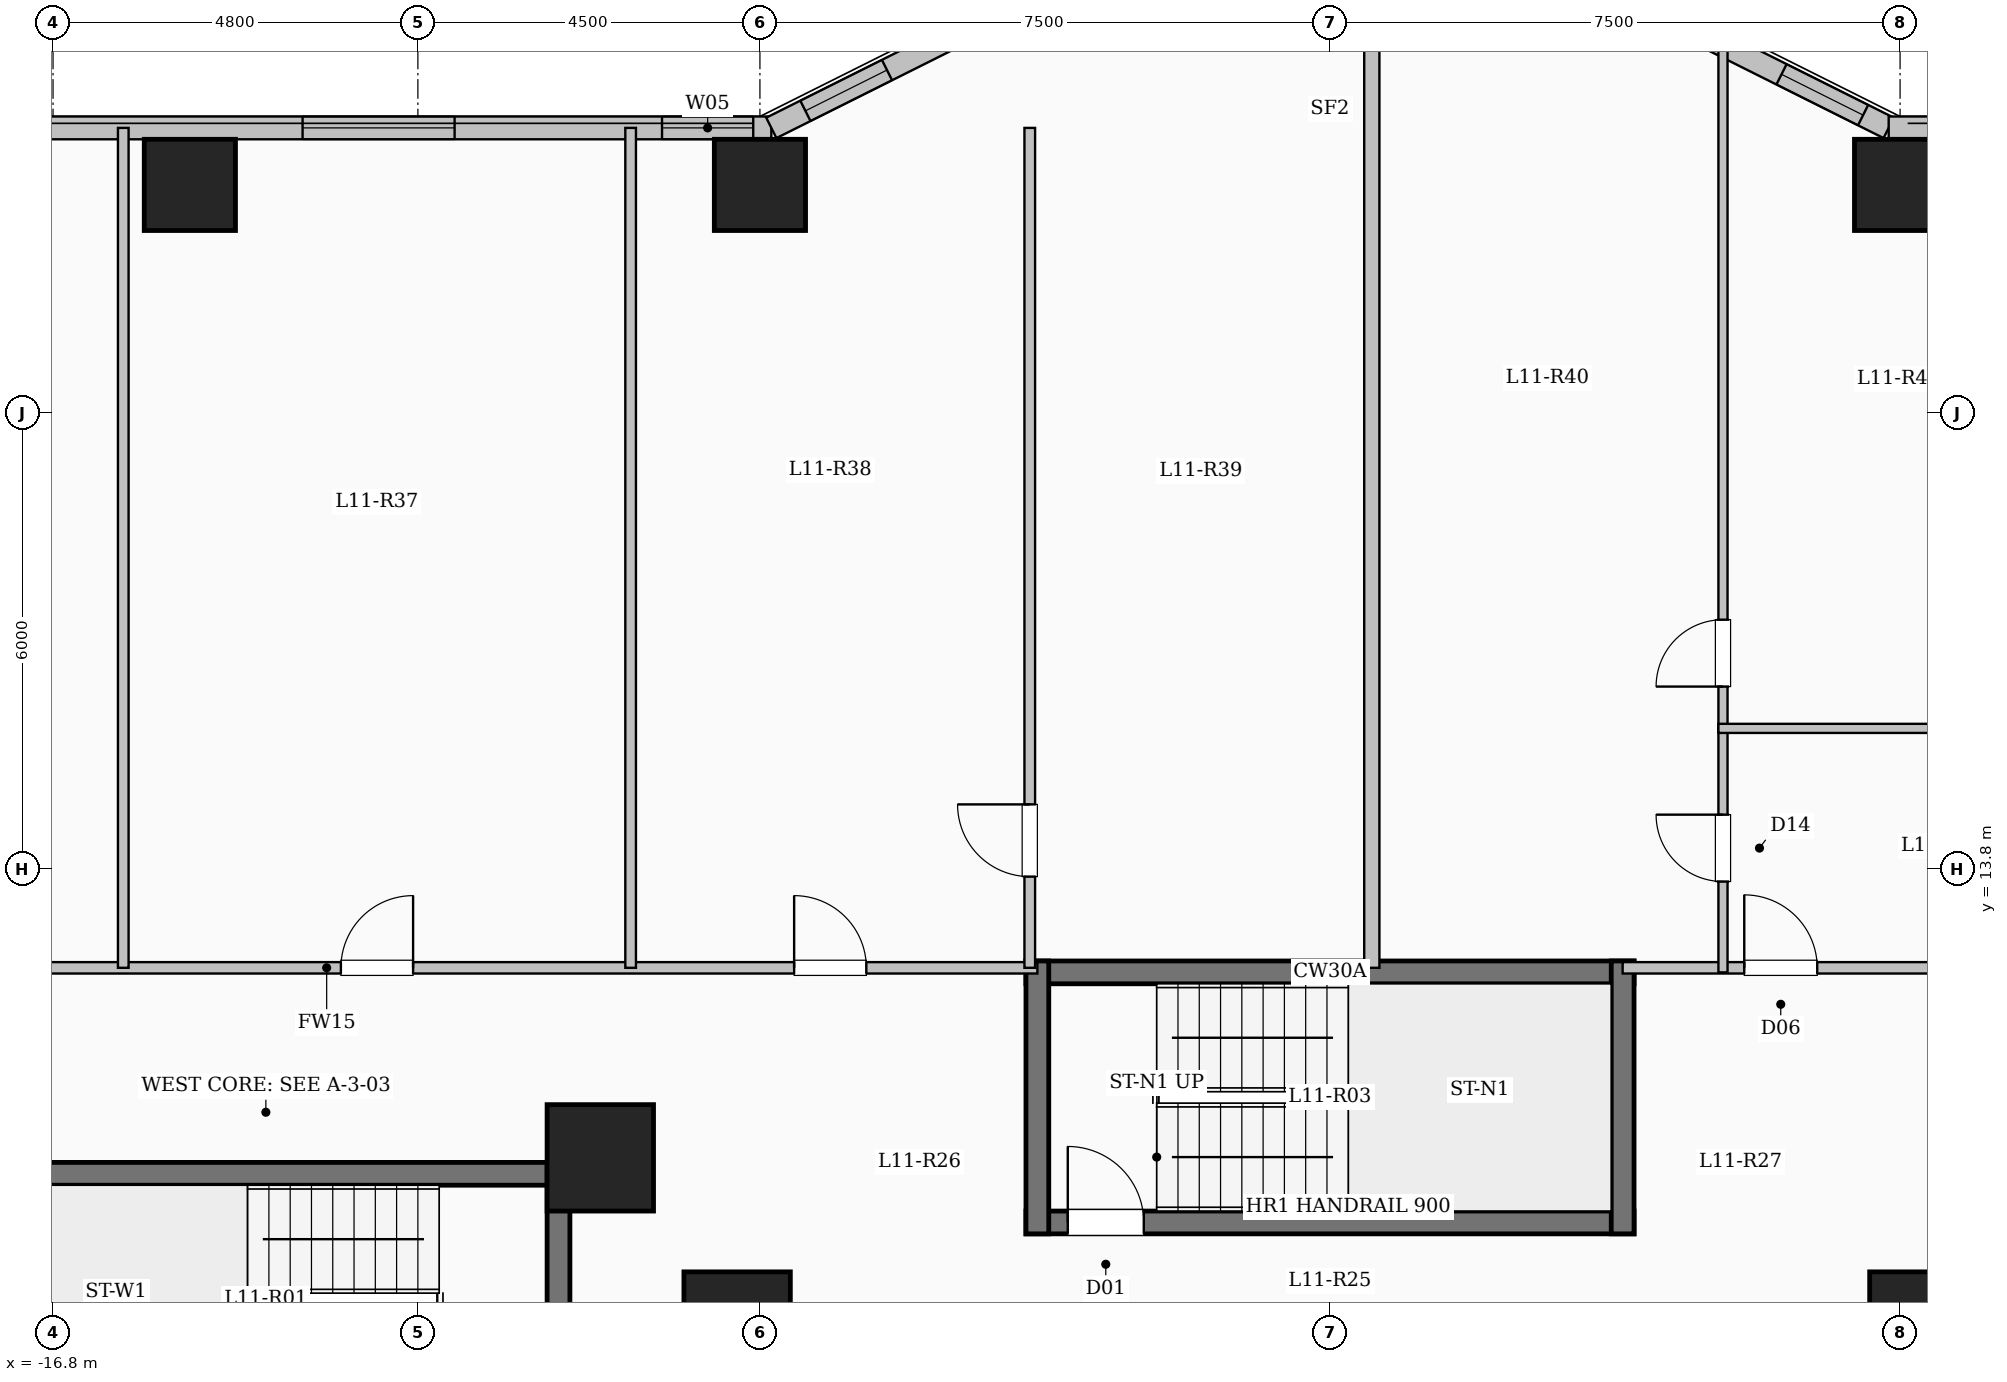
"""IFC4 building model, lengths in metres.
Left out: names, types, materials, properties, quantities, classifications, styles, units other than length and angle.
Written with IfcOpenShell. Run it as: python <this file> out.ifc"""

import sys

from ifc_helpers import new_model, si_unit, direction, frame, frame_2d, origin, origin_2d, place, context, subcontext, project, spatial, rectangle, extrude, element, fill, save


model = new_model("IFC4")
c1 = context("Model", 3, precision=1e-05, world=origin(), true_north=direction((0.0, 1.0)))
c2 = subcontext(c1, "Body", "Model", "MODEL_VIEW")
j1 = project(units=[si_unit("LENGTHUNIT", "METRE"), si_unit("PLANEANGLEUNIT", "RADIAN")], contexts=[c1])
p1 = place(None, origin())
s1 = spatial("IfcSite", under=j1, at=p1, CompositionType="ELEMENT")
p2 = place(p1, origin())
s2 = spatial("IfcBuilding", under=s1, at=p2, CompositionType="ELEMENT")
p3 = place(p2, frame((0.0, 0.0, 44.1)))
s3 = spatial("IfcBuildingStorey", under=s2, at=p3, CompositionType="ELEMENT", Elevation=44.1)
for number, where, z_axis, x_axis in (
    (1, (-7.8, 7.8, 0.0), (0.0, 0.0, 1.0), (1.0, 0.0, 0.0)),
    (2, (7.8, 7.8, 0.0), (0.0, 0.0, 1.0), (1.0, 0.0, 0.0)),
    (3, (-9.6, 10.0, 0.0), (0.0, 0.0, 1.0), (1.0, 0.0, 0.0)),
):
    element("IfcColumn", number, at=place(p3, frame(where, z_axis=z_axis, x_axis=x_axis)), inside=s3, PredefinedType="COLUMN", context=c2, shape_type="SweptSolid", body=[
        extrude(rectangle(XDim=1.4, YDim=1.4, at=origin_2d()), origin(), (0.0, 0.0, 1.0), 3.35),
    ])
for number, where, z_axis, x_axis in (
    (4, (-15.0, 22.8, 0.0), (0.0, 0.0, 1.0), (1.0, 0.0, 0.0)),
    (5, (-7.5, 22.8, 0.0), (0.0, 0.0, 1.0), (1.0, 0.0, 0.0)),
    (6, (7.5, 22.8, 0.0), (0.0, 0.0, 1.0), (1.0, 0.0, 0.0)),
):
    element("IfcColumn", number, at=place(p3, frame(where, z_axis=z_axis, x_axis=x_axis)), inside=s3, PredefinedType="COLUMN", context=c2, shape_type="SweptSolid", body=[
        extrude(rectangle(XDim=1.2, YDim=1.2, at=origin_2d()), origin(), (0.0, 0.0, 1.0), 3.35),
    ])
p4 = place(p3, frame((-22.65, 23.55, 0.0), z_axis=(0.0, 0.0, 1.0), x_axis=(1.0, 0.0, 0.0)))
e7 = element("IfcWall", 7, at=p4, inside=s3, PredefinedType="SOLIDWALL", context=c2, shape_type="SweptSolid", body=[
    extrude(rectangle(XDim=15.3, YDim=0.3, at=frame_2d((7.65, 0.0))), origin(), (0.0, 0.0, 1.0), 3.1),
])
p5 = place(p4, frame((2.411, 0.0, 0.9)))
e8 = element("IfcOpeningElement", 8, at=p5, cuts=e7, PredefinedType="OPENING", context=c2, shape_type="SweptSolid", body=[
    extrude(rectangle(XDim=2.0, YDim=1.7, at=frame_2d((1.0, 0.85))), frame((0.0, 0.16, 0.0), z_axis=(0.0, -1.0, 0.0), x_axis=(1.0, 0.0, 0.0)), (0.0, 0.0, 1.0), 0.32),
])
p6 = place(p4, frame((9.133, 0.0, 0.9)))
e9 = element("IfcOpeningElement", 9, at=p6, cuts=e7, PredefinedType="OPENING", context=c2, shape_type="SweptSolid", body=[
    extrude(rectangle(XDim=2.0, YDim=1.7, at=frame_2d((1.0, 0.85))), frame((0.0, 0.16, 0.0), z_axis=(0.0, -1.0, 0.0), x_axis=(1.0, 0.0, 0.0)), (0.0, 0.0, 1.0), 0.32),
])
p7 = place(p4, frame((13.862, 0.0, 0.95)))
e10 = element("IfcOpeningElement", 10, at=p7, cuts=e7, PredefinedType="OPENING", context=c2, shape_type="SweptSolid", body=[
    extrude(rectangle(XDim=1.2, YDim=1.5, at=frame_2d((0.6, 0.75))), frame((0.0, 0.16, 0.0), z_axis=(0.0, -1.0, 0.0), x_axis=(1.0, 0.0, 0.0)), (0.0, 0.0, 1.0), 0.32),
])
p8 = place(p3, frame((-7.35, 23.55, 0.0), z_axis=(0.0, 0.0, 1.0), x_axis=(0.894427191, 0.4472135955, 0.0)))
e11 = element("IfcWall", 11, at=p8, inside=s3, PredefinedType="SOLIDWALL", context=c2, shape_type="SweptSolid", body=[
    extrude(rectangle(XDim=3.354, YDim=0.3, at=frame_2d((1.677, 0.0))), origin(), (0.0, 0.0, 1.0), 3.1),
])
p9 = place(p8, frame((0.501, 0.0, 0.95)))
e12 = element("IfcOpeningElement", 12, at=p9, cuts=e11, PredefinedType="OPENING", context=c2, shape_type="SweptSolid", body=[
    extrude(rectangle(XDim=1.2, YDim=1.5, at=frame_2d((0.6, 0.75))), frame((0.0, 0.16, 0.0), z_axis=(0.0, -1.0, 0.0), x_axis=(1.0, 0.0, 0.0)), (0.0, 0.0, 1.0), 0.32),
])
p10 = place(p3, frame((4.35, 25.05, 0.0), z_axis=(0.0, 0.0, 1.0), x_axis=(0.894427191, -0.4472135955, 0.0)))
e13 = element("IfcWall", 13, at=p10, inside=s3, PredefinedType="SOLIDWALL", context=c2, shape_type="SweptSolid", body=[
    extrude(rectangle(XDim=3.354, YDim=0.3, at=frame_2d((1.677, 0.0))), origin(), (0.0, 0.0, 1.0), 3.1),
])
p11 = place(p10, frame((1.778, 0.0, 0.95)))
e14 = element("IfcOpeningElement", 14, at=p11, cuts=e13, PredefinedType="OPENING", context=c2, shape_type="SweptSolid", body=[
    extrude(rectangle(XDim=1.2, YDim=1.5, at=frame_2d((0.6, 0.75))), frame((0.0, 0.16, 0.0), z_axis=(0.0, -1.0, 0.0), x_axis=(1.0, 0.0, 0.0)), (0.0, 0.0, 1.0), 0.32),
])
p12 = place(p3, frame((7.35, 23.55, 0.0), z_axis=(0.0, 0.0, 1.0), x_axis=(1.0, 0.0, 0.0)))
e15 = element("IfcWall", 15, at=p12, inside=s3, PredefinedType="SOLIDWALL", context=c2, shape_type="SweptSolid", body=[
    extrude(rectangle(XDim=15.3, YDim=0.3, at=frame_2d((7.65, 0.0))), origin(), (0.0, 0.0, 1.0), 3.1),
])
p13 = place(p12, frame((0.554, 0.0, 0.95)))
e16 = element("IfcOpeningElement", 16, at=p13, cuts=e15, PredefinedType="OPENING", context=c2, shape_type="SweptSolid", body=[
    extrude(rectangle(XDim=1.2, YDim=1.5, at=frame_2d((0.6, 0.75))), frame((0.0, 0.16, 0.0), z_axis=(0.0, -1.0, 0.0), x_axis=(1.0, 0.0, 0.0)), (0.0, 0.0, 1.0), 0.32),
])
p14 = place(p12, frame((4.418, 0.0, 0.9)))
e17 = element("IfcOpeningElement", 17, at=p14, cuts=e15, PredefinedType="OPENING", context=c2, shape_type="SweptSolid", body=[
    extrude(rectangle(XDim=2.4, YDim=1.8, at=frame_2d((1.2, 0.9))), frame((0.0, 0.16, 0.0), z_axis=(0.0, -1.0, 0.0), x_axis=(1.0, 0.0, 0.0)), (0.0, 0.0, 1.0), 0.32),
])
p15 = place(p12, frame((9.634, 0.0, 0.9)))
e18 = element("IfcOpeningElement", 18, at=p15, cuts=e15, PredefinedType="OPENING", context=c2, shape_type="SweptSolid", body=[
    extrude(rectangle(XDim=1.5, YDim=1.65, at=frame_2d((0.75, 0.825))), frame((0.0, 0.16, 0.0), z_axis=(0.0, -1.0, 0.0), x_axis=(1.0, 0.0, 0.0)), (0.0, 0.0, 1.0), 0.32),
])
p16 = place(p12, frame((12.844, 0.0, 0.9)))
e19 = element("IfcOpeningElement", 19, at=p16, cuts=e15, PredefinedType="OPENING", context=c2, shape_type="SweptSolid", body=[
    extrude(rectangle(XDim=1.5, YDim=1.65, at=frame_2d((0.75, 0.825))), frame((0.0, 0.16, 0.0), z_axis=(0.0, -1.0, 0.0), x_axis=(1.0, 0.0, 0.0)), (0.0, 0.0, 1.0), 0.32),
])
p17 = place(p3, frame((-18.0, 9.79, 0.0), z_axis=(0.0, 0.0, 1.0), x_axis=(1.0, 0.0, 0.0)))
e20 = element("IfcWall", 20, at=p17, inside=s3, PredefinedType="SHEAR", context=c2, shape_type="SweptSolid", body=[
    extrude(rectangle(XDim=8.0, YDim=0.3, at=frame_2d((4.0, 0.0))), origin(), (0.0, 0.0, 1.0), 3.35),
])
p18 = place(p3, frame((-10.15, 6.35, 0.0), z_axis=(0.0, 0.0, 1.0), x_axis=(0.0, 1.0, 0.0)))
e21 = element("IfcWall", 21, at=p18, inside=s3, PredefinedType="SHEAR", context=c2, shape_type="SweptSolid", body=[
    extrude(rectangle(XDim=3.59, YDim=0.3, at=frame_2d((1.795, 0.0))), origin(), (0.0, 0.0, 1.0), 3.35),
])
p19 = place(p3, frame((-4.0, 12.44, 0.0), z_axis=(0.0, 0.0, 1.0), x_axis=(1.0, 0.0, 0.0)))
e22 = element("IfcWall", 22, at=p19, inside=s3, PredefinedType="SHEAR", context=c2, shape_type="SweptSolid", body=[
    extrude(rectangle(XDim=8.0, YDim=0.3, at=frame_2d((4.0, 0.0))), origin(), (0.0, 0.0, 1.0), 3.35),
])
p20 = place(p3, frame((-4.0, 9.15, 0.0), z_axis=(0.0, 0.0, 1.0), x_axis=(1.0, 0.0, 0.0)))
e23 = element("IfcWall", 23, at=p20, inside=s3, PredefinedType="SHEAR", context=c2, shape_type="SweptSolid", body=[
    extrude(rectangle(XDim=8.0, YDim=0.3, at=frame_2d((4.0, 0.0))), origin(), (0.0, 0.0, 1.0), 3.35),
])
p21 = place(p20, frame((0.55, 0.0, 0.0)))
e24 = element("IfcOpeningElement", 24, at=p21, cuts=e23, PredefinedType="OPENING", context=c2, shape_type="SweptSolid", body=[
    extrude(rectangle(XDim=1.0, YDim=2.15, at=frame_2d((0.5, 1.075))), frame((0.0, 0.16, 0.0), z_axis=(0.0, -1.0, 0.0), x_axis=(1.0, 0.0, 0.0)), (0.0, 0.0, 1.0), 0.32),
])
for number, where, z_axis, x_axis in (
    (25, (-3.85, 9.0, 0.0), (0.0, 0.0, 1.0), (0.0, 1.0, 0.0)),
    (26, (3.85, 9.0, 0.0), (0.0, 0.0, 1.0), (0.0, 1.0, 0.0)),
):
    element("IfcWall", number, at=place(p3, frame(where, z_axis=z_axis, x_axis=x_axis)), inside=s3, PredefinedType="SHEAR", context=c2, shape_type="SweptSolid", body=[
        extrude(rectangle(XDim=3.59, YDim=0.3, at=frame_2d((1.795, 0.0))), origin(), (0.0, 0.0, 1.0), 3.35),
    ])
p22 = place(p3, frame((-22.55, 12.5, 0.0), z_axis=(0.0, 0.0, 1.0), x_axis=(1.0, 0.0, 0.0)))
e27 = element("IfcWall", 27, at=p22, inside=s3, PredefinedType="PARTITIONING", context=c2, shape_type="SweptSolid", body=[
    extrude(rectangle(XDim=18.7, YDim=0.15, at=frame_2d((9.35, 0.0))), origin(), (0.0, 0.0, 1.0), 3.1),
])
p23 = place(p22, frame((2.832, 0.0, 0.0)))
e28 = element("IfcOpeningElement", 28, at=p23, cuts=e27, PredefinedType="OPENING", context=c2, shape_type="SweptSolid", body=[
    extrude(rectangle(XDim=0.95, YDim=2.15, at=frame_2d((0.475, 1.075))), frame((0.0, 0.085, 0.0), z_axis=(0.0, -1.0, 0.0), x_axis=(1.0, 0.0, 0.0)), (0.0, 0.0, 1.0), 0.17),
])
p24 = place(p22, frame((9.537, 0.0, 0.0)))
e29 = element("IfcOpeningElement", 29, at=p24, cuts=e27, PredefinedType="OPENING", context=c2, shape_type="SweptSolid", body=[
    extrude(rectangle(XDim=0.95, YDim=2.15, at=frame_2d((0.475, 1.075))), frame((0.0, 0.085, 0.0), z_axis=(0.0, -1.0, 0.0), x_axis=(1.0, 0.0, 0.0)), (0.0, 0.0, 1.0), 0.17),
])
p25 = place(p22, frame((15.5, 0.0, 0.0)))
e30 = element("IfcOpeningElement", 30, at=p25, cuts=e27, PredefinedType="OPENING", context=c2, shape_type="SweptSolid", body=[
    extrude(rectangle(XDim=0.95, YDim=2.15, at=frame_2d((0.475, 1.075))), frame((0.0, 0.085, 0.0), z_axis=(0.0, -1.0, 0.0), x_axis=(1.0, 0.0, 0.0)), (0.0, 0.0, 1.0), 0.17),
])
p26 = place(p3, frame((3.85, 12.5, 0.0), z_axis=(0.0, 0.0, 1.0), x_axis=(1.0, 0.0, 0.0)))
e31 = element("IfcWall", 31, at=p26, inside=s3, PredefinedType="PARTITIONING", context=c2, shape_type="SweptSolid", body=[
    extrude(rectangle(XDim=18.7, YDim=0.15, at=frame_2d((9.35, 0.0))), origin(), (0.0, 0.0, 1.0), 3.1),
])
p27 = place(p26, frame((1.6, 0.0, 0.0)))
e32 = element("IfcOpeningElement", 32, at=p27, cuts=e31, PredefinedType="OPENING", context=c2, shape_type="SweptSolid", body=[
    extrude(rectangle(XDim=0.96, YDim=2.15, at=frame_2d((0.48, 1.075))), frame((0.0, 0.085, 0.0), z_axis=(0.0, -1.0, 0.0), x_axis=(1.0, 0.0, 0.0)), (0.0, 0.0, 1.0), 0.17),
])
p28 = place(p26, frame((6.64, 0.0, 0.0)))
e33 = element("IfcOpeningElement", 33, at=p28, cuts=e31, PredefinedType="OPENING", context=c2, shape_type="SweptSolid", body=[
    extrude(rectangle(XDim=0.96, YDim=2.15, at=frame_2d((0.48, 1.075))), frame((0.0, 0.085, 0.0), z_axis=(0.0, -1.0, 0.0), x_axis=(1.0, 0.0, 0.0)), (0.0, 0.0, 1.0), 0.17),
])
p29 = place(p3, frame((0.55, 12.5, 0.0), z_axis=(0.0, 0.0, 1.0), x_axis=(0.0, 1.0, 0.0)))
e34 = element("IfcWall", 34, at=p29, inside=s3, PredefinedType="SOLIDWALL", context=c2, shape_type="SweptSolid", body=[
    extrude(rectangle(XDim=12.58, YDim=0.2, at=frame_2d((6.29, 0.0))), origin(), (0.0, 0.0, 1.0), 3.1),
])
p30 = place(p3, frame((-3.95, 12.5, 0.0), z_axis=(0.0, 0.0, 1.0), x_axis=(0.0, 1.0, 0.0)))
e35 = element("IfcWall", 35, at=p30, inside=s3, PredefinedType="PARTITIONING", context=c2, shape_type="SweptSolid", body=[
    extrude(rectangle(XDim=11.05, YDim=0.14, at=frame_2d((5.525, 0.0))), origin(), (0.0, 0.0, 1.0), 3.1),
])
p31 = place(p30, frame((1.2, 0.0, 0.0)))
e36 = element("IfcOpeningElement", 36, at=p31, cuts=e35, PredefinedType="OPENING", context=c2, shape_type="SweptSolid", body=[
    extrude(rectangle(XDim=0.95, YDim=2.15, at=frame_2d((0.475, 1.075))), frame((0.0, 0.08, 0.0), z_axis=(0.0, -1.0, 0.0), x_axis=(1.0, 0.0, 0.0)), (0.0, 0.0, 1.0), 0.16),
])
for number, where, z_axis, x_axis in (
    (37, (-15.876, 12.5, 0.0), (0.0, 0.0, 1.0), (0.0, 1.0, 0.0)),
    (38, (-9.201, 12.5, 0.0), (0.0, 0.0, 1.0), (0.0, 1.0, 0.0)),
):
    element("IfcWall", number, at=place(p3, frame(where, z_axis=z_axis, x_axis=x_axis)), inside=s3, PredefinedType="PARTITIONING", context=c2, shape_type="SweptSolid", body=[
        extrude(rectangle(XDim=11.05, YDim=0.14, at=frame_2d((5.525, 0.0))), origin(), (0.0, 0.0, 1.0), 3.1),
    ])
p32 = place(p3, frame((5.17, 12.44, 0.0), z_axis=(0.0, 0.0, 1.0), x_axis=(0.0, 1.0, 0.0)))
e39 = element("IfcWall", 39, at=p32, inside=s3, PredefinedType="PARTITIONING", context=c2, shape_type="SweptSolid", body=[
    extrude(rectangle(XDim=3.21, YDim=0.12, at=frame_2d((1.605, 0.0))), origin(), (0.0, 0.0, 1.0), 3.1),
])
p33 = place(p32, frame((1.195, 0.0, 0.0)))
e40 = element("IfcOpeningElement", 40, at=p33, cuts=e39, PredefinedType="OPENING", context=c2, shape_type="SweptSolid", body=[
    extrude(rectangle(XDim=0.88, YDim=2.1, at=frame_2d((0.44, 1.05))), frame((0.0, 0.07, 0.0), z_axis=(0.0, -1.0, 0.0), x_axis=(1.0, 0.0, 0.0)), (0.0, 0.0, 1.0), 0.14),
])
p34 = place(p3, frame((5.17, 15.65, 0.0), z_axis=(0.0, 0.0, 1.0), x_axis=(0.0, 1.0, 0.0)))
e41 = element("IfcWall", 41, at=p34, inside=s3, PredefinedType="PARTITIONING", context=c2, shape_type="SweptSolid", body=[
    extrude(rectangle(XDim=9.388, YDim=0.12, at=frame_2d((4.694, 0.0))), origin(), (0.0, 0.0, 1.0), 3.1),
])
p35 = place(p34, frame((0.55, 0.0, 0.0)))
e42 = element("IfcOpeningElement", 42, at=p35, cuts=e41, PredefinedType="OPENING", context=c2, shape_type="SweptSolid", body=[
    extrude(rectangle(XDim=0.88, YDim=2.1, at=frame_2d((0.44, 1.05))), frame((0.0, 0.07, 0.0), z_axis=(0.0, -1.0, 0.0), x_axis=(1.0, 0.0, 0.0)), (0.0, 0.0, 1.0), 0.14),
])
p36 = place(p3, frame((5.11, 15.65, 0.0), z_axis=(0.0, 0.0, 1.0), x_axis=(1.0, 0.0, 0.0)))
e43 = element("IfcWall", 43, at=p36, inside=s3, PredefinedType="PARTITIONING", context=c2, shape_type="SweptSolid", body=[
    extrude(rectangle(XDim=4.74, YDim=0.12, at=frame_2d((2.37, 0.0))), origin(), (0.0, 0.0, 1.0), 3.1),
])
p37 = place(p6, origin())
e44 = element("IfcWindow", 44, at=p37, inside=s3, PartitioningType="SINGLE_PANEL", PredefinedType="WINDOW", context=c2, shape_type="SweptSolid", body=[
    extrude(rectangle(XDim=2.0, YDim=1.7, at=frame_2d((1.0, 0.85))), frame((0.0, 0.03, 0.0), z_axis=(0.0, -1.0, 0.0), x_axis=(1.0, 0.0, 0.0)), (0.0, 0.0, 1.0), 0.06),
])
fill(e9, e44)
p38 = place(p7, origin())
e45 = element("IfcWindow", 45, at=p38, inside=s3, PartitioningType="SINGLE_PANEL", PredefinedType="WINDOW", context=c2, shape_type="SweptSolid", body=[
    extrude(rectangle(XDim=1.2, YDim=1.5, at=frame_2d((0.6, 0.75))), frame((0.0, 0.03, 0.0), z_axis=(0.0, -1.0, 0.0), x_axis=(1.0, 0.0, 0.0)), (0.0, 0.0, 1.0), 0.06),
])
fill(e10, e45)
p39 = place(p9, origin())
e46 = element("IfcWindow", 46, at=p39, inside=s3, PartitioningType="SINGLE_PANEL", PredefinedType="WINDOW", context=c2, shape_type="SweptSolid", body=[
    extrude(rectangle(XDim=1.2, YDim=1.5, at=frame_2d((0.6, 0.75))), frame((0.0, 0.03, 0.0), z_axis=(0.0, -1.0, 0.0), x_axis=(1.0, 0.0, 0.0)), (0.0, 0.0, 1.0), 0.06),
])
fill(e12, e46)
p40 = place(p11, origin())
e47 = element("IfcWindow", 47, at=p40, inside=s3, PartitioningType="SINGLE_PANEL", PredefinedType="WINDOW", context=c2, shape_type="SweptSolid", body=[
    extrude(rectangle(XDim=1.2, YDim=1.5, at=frame_2d((0.6, 0.75))), frame((0.0, 0.03, 0.0), z_axis=(0.0, -1.0, 0.0), x_axis=(1.0, 0.0, 0.0)), (0.0, 0.0, 1.0), 0.06),
])
fill(e14, e47)
p41 = place(p21, origin())
e48 = element("IfcDoor", 48, at=p41, inside=s3, OperationType="SINGLE_SWING_LEFT", PredefinedType="DOOR", context=c2, shape_type="SweptSolid", body=[
    extrude(rectangle(XDim=1.0, YDim=2.15, at=frame_2d((0.5, 1.075))), frame((0.0, 0.025, 0.0), z_axis=(0.0, -1.0, 0.0), x_axis=(1.0, 0.0, 0.0)), (0.0, 0.0, 1.0), 0.05),
])
fill(e24, e48)
p42 = place(p24, origin())
e49 = element("IfcDoor", 49, at=p42, inside=s3, OperationType="SINGLE_SWING_RIGHT", PredefinedType="DOOR", context=c2, shape_type="SweptSolid", body=[
    extrude(rectangle(XDim=0.95, YDim=2.15, at=frame_2d((0.475, 1.075))), frame((0.0, 0.025, 0.0), z_axis=(0.0, -1.0, 0.0), x_axis=(1.0, 0.0, 0.0)), (0.0, 0.0, 1.0), 0.05),
])
fill(e29, e49)
p43 = place(p25, origin())
e50 = element("IfcDoor", 50, at=p43, inside=s3, OperationType="SINGLE_SWING_LEFT", PredefinedType="DOOR", context=c2, shape_type="SweptSolid", body=[
    extrude(rectangle(XDim=0.95, YDim=2.15, at=frame_2d((0.475, 1.075))), frame((0.0, 0.025, 0.0), z_axis=(0.0, -1.0, 0.0), x_axis=(1.0, 0.0, 0.0)), (0.0, 0.0, 1.0), 0.05),
])
fill(e30, e50)
p44 = place(p31, origin())
e51 = element("IfcDoor", 51, at=p44, inside=s3, OperationType="SINGLE_SWING_RIGHT", PredefinedType="DOOR", context=c2, shape_type="SweptSolid", body=[
    extrude(rectangle(XDim=0.95, YDim=2.15, at=frame_2d((0.475, 1.075))), frame((0.0, 0.025, 0.0), z_axis=(0.0, -1.0, 0.0), x_axis=(1.0, 0.0, 0.0)), (0.0, 0.0, 1.0), 0.05),
])
fill(e36, e51)
p45 = place(p27, origin())
e52 = element("IfcDoor", 52, at=p45, inside=s3, OperationType="SINGLE_SWING_LEFT", PredefinedType="DOOR", context=c2, shape_type="SweptSolid", body=[
    extrude(rectangle(XDim=0.96, YDim=2.15, at=frame_2d((0.48, 1.075))), frame((0.0, 0.025, 0.0), z_axis=(0.0, -1.0, 0.0), x_axis=(1.0, 0.0, 0.0)), (0.0, 0.0, 1.0), 0.05),
])
fill(e32, e52)
p46 = place(p33, origin())
e53 = element("IfcDoor", 53, at=p46, inside=s3, OperationType="SINGLE_SWING_RIGHT", PredefinedType="DOOR", context=c2, shape_type="SweptSolid", body=[
    extrude(rectangle(XDim=0.88, YDim=2.1, at=frame_2d((0.44, 1.05))), frame((0.0, 0.025, 0.0), z_axis=(0.0, -1.0, 0.0), x_axis=(1.0, 0.0, 0.0)), (0.0, 0.0, 1.0), 0.05),
])
fill(e40, e53)
p47 = place(p35, origin())
e54 = element("IfcDoor", 54, at=p47, inside=s3, OperationType="SINGLE_SWING_LEFT", PredefinedType="DOOR", context=c2, shape_type="SweptSolid", body=[
    extrude(rectangle(XDim=0.88, YDim=2.1, at=frame_2d((0.44, 1.05))), frame((0.0, 0.025, 0.0), z_axis=(0.0, -1.0, 0.0), x_axis=(1.0, 0.0, 0.0)), (0.0, 0.0, 1.0), 0.05),
])
fill(e42, e54)
save(model, sys.argv[1])
